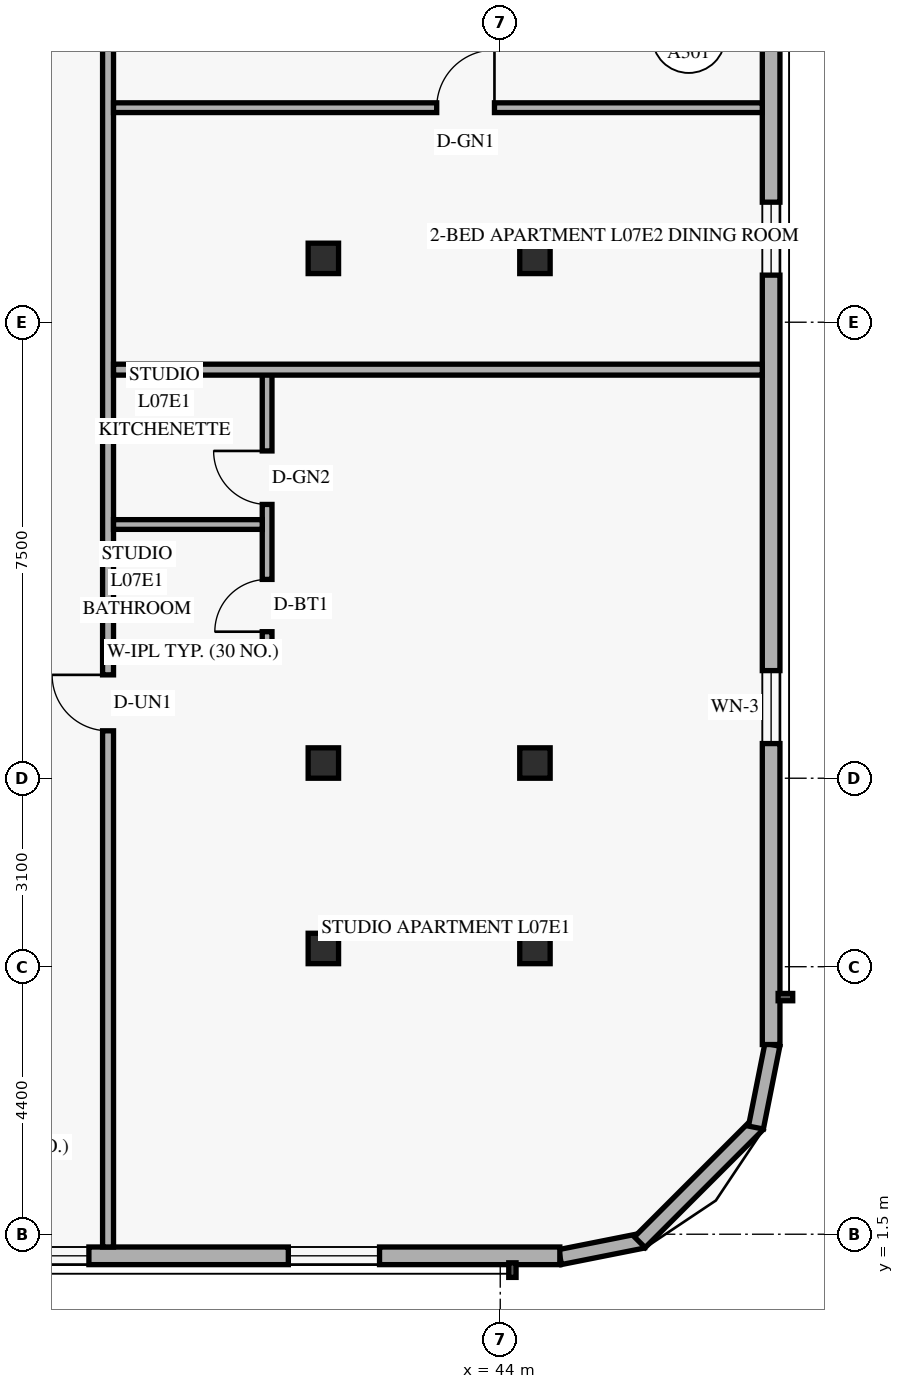
"""IFC4 building model, lengths in metres.
Left out: names, types, materials, properties, quantities, classifications, styles, units other than length and angle.
Written with IfcOpenShell. Run it as: python <this file> out.ifc"""

import sys

from ifc_helpers import new_model, si_unit, direction, frame, frame_2d, origin, origin_2d, place, context, subcontext, project, spatial, rectangle, hollow_rectangle, extrude, element, fill, save


model = new_model("IFC4")
c1 = context("Model", 3, precision=1e-05, world=origin(), true_north=direction((0.0, 1.0)))
c2 = subcontext(c1, "Body", "Model", "MODEL_VIEW")
j1 = project(units=[si_unit("LENGTHUNIT", "METRE"), si_unit("PLANEANGLEUNIT", "RADIAN")], contexts=[c1])
p1 = place(None, origin())
s1 = spatial("IfcSite", under=j1, at=p1, CompositionType="ELEMENT")
p2 = place(p1, origin())
s2 = spatial("IfcBuilding", under=s1, at=p2, CompositionType="ELEMENT")
p3 = place(p2, frame((0.0, 0.0, 31.2)))
s3 = spatial("IfcBuildingStorey", under=s2, at=p3, CompositionType="ELEMENT", Elevation=31.2)
for number, where, z_axis, x_axis in (
    (1, (41.028, 6.2, 0.0), (0.035, 0.0, 0.999), (0.0, 1.0, 0.0)),
    (2, (41.028, 9.25, 0.0), (0.035, 0.0, 0.999), (0.0, 1.0, 0.0)),
    (3, (41.028, 17.55, 0.0), (0.035, 0.0, 0.999), (0.0, 1.0, 0.0)),
):
    element("IfcColumn", number, at=place(p3, frame(where, z_axis=z_axis, x_axis=x_axis)), inside=s3, PredefinedType="COLUMN", context=c2, shape_type="SweptSolid", body=[
        extrude(hollow_rectangle(XDim=0.5, YDim=0.5, WallThickness=0.022, at=origin_2d()), origin(), (0.0, 0.0, 1.0), 3.602),
    ])
for number, where, z_axis, x_axis in (
    (4, (44.466, 6.2, 0.0), (0.058, 0.0, 0.998), (0.0, 1.0, 0.0)),
    (5, (44.466, 9.25, 0.0), (0.058, 0.0, 0.998), (0.0, 1.0, 0.0)),
    (6, (44.466, 17.55, 0.0), (0.058, 0.0, 0.998), (0.0, 1.0, 0.0)),
):
    element("IfcColumn", number, at=place(p3, frame(where, z_axis=z_axis, x_axis=x_axis)), inside=s3, PredefinedType="COLUMN", context=c2, shape_type="SweptSolid", body=[
        extrude(hollow_rectangle(XDim=0.5, YDim=0.5, WallThickness=0.022, at=origin_2d()), origin(), (0.0, 0.0, 1.0), 3.606),
    ])
p4 = place(p3, frame((44.983, 1.124, 0.0), z_axis=(0.0, 0.0, 1.0), x_axis=(0.980809899341, 0.19496651342, 0.0)))
e7 = element("IfcWall", 7, at=p4, inside=s3, PredefinedType="SOLIDWALL", context=c2, shape_type="SweptSolid", body=[
    extrude(rectangle(XDim=1.389, YDim=0.25, at=frame_2d((0.694, 0.0))), origin(), (0.0, 0.0, 1.0), 3.36),
])
p5 = place(p3, frame((46.295, 1.368, 0.0), z_axis=(0.0, 0.0, 1.0), x_axis=(0.707106781187, 0.707106781187, 0.0)))
e8 = element("IfcWall", 8, at=p5, inside=s3, PredefinedType="SOLIDWALL", context=c2, shape_type="SweptSolid", body=[
    extrude(rectangle(XDim=2.739, YDim=0.25, at=frame_2d((1.37, 0.0))), origin(), (0.0, 0.0, 1.0), 3.36),
])
p6 = place(p3, frame((48.205, 3.254, 0.0), z_axis=(0.0, 0.0, 1.0), x_axis=(0.19496651342, 0.980809899341, 0.0)))
e9 = element("IfcWall", 9, at=p6, inside=s3, PredefinedType="SOLIDWALL", context=c2, shape_type="SweptSolid", body=[
    extrude(rectangle(XDim=1.389, YDim=0.25, at=frame_2d((0.694, 0.0))), origin(), (0.0, 0.0, 1.0), 3.36),
])
p7 = place(p3, frame((31.03, 1.145, 0.0), z_axis=(0.0, 0.0, 1.0), x_axis=(1.0, 0.0, 0.0)))
e10 = element("IfcWall", 10, at=p7, inside=s3, PredefinedType="SOLIDWALL", context=c2, shape_type="SweptSolid", body=[
    extrude(rectangle(XDim=13.95, YDim=0.29, at=frame_2d((6.975, 0.0))), origin(), (0.0, 0.0, 1.0), 3.36),
])
p8 = place(p7, frame((1.445, 0.0, 0.85)))
e11 = element("IfcOpeningElement", 11, at=p8, cuts=e10, PredefinedType="OPENING", context=c2, shape_type="SweptSolid", body=[
    extrude(rectangle(XDim=1.5, YDim=1.55, at=frame_2d((0.75, 0.775))), frame((0.0, 0.155, 0.0), z_axis=(0.0, -1.0, 0.0), x_axis=(1.0, 0.0, 0.0)), (0.0, 0.0, 1.0), 0.31),
])
p9 = place(p7, frame((4.705, 0.0, 0.85)))
e12 = element("IfcOpeningElement", 12, at=p9, cuts=e10, PredefinedType="OPENING", context=c2, shape_type="SweptSolid", body=[
    extrude(rectangle(XDim=1.5, YDim=1.55, at=frame_2d((0.75, 0.775))), frame((0.0, 0.155, 0.0), z_axis=(0.0, -1.0, 0.0), x_axis=(1.0, 0.0, 0.0)), (0.0, 0.0, 1.0), 0.31),
])
p10 = place(p7, frame((9.485, 0.0, 0.85)))
e13 = element("IfcOpeningElement", 13, at=p10, cuts=e10, PredefinedType="OPENING", context=c2, shape_type="SweptSolid", body=[
    extrude(rectangle(XDim=1.5, YDim=1.55, at=frame_2d((0.75, 0.775))), frame((0.0, 0.155, 0.0), z_axis=(0.0, -1.0, 0.0), x_axis=(1.0, 0.0, 0.0)), (0.0, 0.0, 1.0), 0.31),
])
p11 = place(p3, frame((48.455, 4.62, 0.0), z_axis=(0.0, 0.0, 1.0), x_axis=(0.0, 1.0, 0.0)))
e14 = element("IfcWall", 14, at=p11, inside=s3, PredefinedType="SOLIDWALL", context=c2, shape_type="SweptSolid", body=[
    extrude(rectangle(XDim=38.76, YDim=0.29, at=frame_2d((19.38, 0.0))), origin(), (0.0, 0.0, 1.0), 3.36),
])
p12 = place(p11, frame((4.95, 0.0, 0.85)))
e15 = element("IfcOpeningElement", 15, at=p12, cuts=e14, PredefinedType="OPENING", context=c2, shape_type="SweptSolid", body=[
    extrude(rectangle(XDim=1.2, YDim=1.5, at=frame_2d((0.6, 0.75))), frame((0.0, 0.155, 0.0), z_axis=(0.0, -1.0, 0.0), x_axis=(1.0, 0.0, 0.0)), (0.0, 0.0, 1.0), 0.31),
])
p13 = place(p11, frame((12.654, 0.0, 0.85)))
e16 = element("IfcOpeningElement", 16, at=p13, cuts=e14, PredefinedType="OPENING", context=c2, shape_type="SweptSolid", body=[
    extrude(rectangle(XDim=1.2, YDim=1.5, at=frame_2d((0.6, 0.75))), frame((0.0, 0.155, 0.0), z_axis=(0.0, -1.0, 0.0), x_axis=(1.0, 0.0, 0.0)), (0.0, 0.0, 1.0), 0.31),
])
p14 = place(p11, frame((18.479, 0.0, 0.85)))
e17 = element("IfcOpeningElement", 17, at=p14, cuts=e14, PredefinedType="OPENING", context=c2, shape_type="SweptSolid", body=[
    extrude(rectangle(XDim=1.2, YDim=1.5, at=frame_2d((0.6, 0.75))), frame((0.0, 0.155, 0.0), z_axis=(0.0, -1.0, 0.0), x_axis=(1.0, 0.0, 0.0)), (0.0, 0.0, 1.0), 0.31),
])
p15 = place(p11, frame((24.145, 0.0, 0.85)))
e18 = element("IfcOpeningElement", 18, at=p15, cuts=e14, PredefinedType="OPENING", context=c2, shape_type="SweptSolid", body=[
    extrude(rectangle(XDim=1.2, YDim=1.5, at=frame_2d((0.6, 0.75))), frame((0.0, 0.155, 0.0), z_axis=(0.0, -1.0, 0.0), x_axis=(1.0, 0.0, 0.0)), (0.0, 0.0, 1.0), 0.31),
])
p16 = place(p11, frame((32.15, 0.0, 0.85)))
e19 = element("IfcOpeningElement", 19, at=p16, cuts=e14, PredefinedType="OPENING", context=c2, shape_type="SweptSolid", body=[
    extrude(rectangle(XDim=1.2, YDim=1.5, at=frame_2d((0.6, 0.75))), frame((0.0, 0.155, 0.0), z_axis=(0.0, -1.0, 0.0), x_axis=(1.0, 0.0, 0.0)), (0.0, 0.0, 1.0), 0.31),
])
p17 = place(p3, frame((37.55, 1.29, 0.0), z_axis=(0.0, 0.0, 1.0), x_axis=(0.0, 1.0, 0.0)))
e20 = element("IfcWall", 20, at=p17, inside=s3, PredefinedType="STANDARD", context=c2, shape_type="SweptSolid", body=[
    extrude(rectangle(XDim=45.42, YDim=0.18, at=frame_2d((22.71, 0.0))), origin(), (0.0, 0.0, 1.0), 2.649),
])
p18 = place(p17, frame((8.49, 0.0, 0.0)))
e21 = element("IfcOpeningElement", 21, at=p18, cuts=e20, PredefinedType="OPENING", context=c2, shape_type="SweptSolid", body=[
    extrude(rectangle(XDim=0.92, YDim=2.15, at=frame_2d((0.46, 1.075))), frame((0.0, 0.1, 0.0), z_axis=(0.0, -1.0, 0.0), x_axis=(1.0, 0.0, 0.0)), (0.0, 0.0, 1.0), 0.2),
])
p19 = place(p17, frame((20.073, 0.0, 0.0)))
e22 = element("IfcOpeningElement", 22, at=p19, cuts=e20, PredefinedType="OPENING", context=c2, shape_type="SweptSolid", body=[
    extrude(rectangle(XDim=0.92, YDim=2.15, at=frame_2d((0.46, 1.075))), frame((0.0, 0.1, 0.0), z_axis=(0.0, -1.0, 0.0), x_axis=(1.0, 0.0, 0.0)), (0.0, 0.0, 1.0), 0.2),
])
p20 = place(p17, frame((35.256, 0.0, 0.0)))
e23 = element("IfcOpeningElement", 23, at=p20, cuts=e20, PredefinedType="OPENING", context=c2, shape_type="SweptSolid", body=[
    extrude(rectangle(XDim=0.92, YDim=2.15, at=frame_2d((0.46, 1.075))), frame((0.0, 0.1, 0.0), z_axis=(0.0, -1.0, 0.0), x_axis=(1.0, 0.0, 0.0)), (0.0, 0.0, 1.0), 0.2),
])
p21 = place(p3, frame((37.64, 11.08, 0.0), z_axis=(0.0, 0.0, 1.0), x_axis=(1.0, 0.0, 0.0)))
e24 = element("IfcWall", 24, at=p21, inside=s3, PredefinedType="PLUMBINGWALL", context=c2, shape_type="SweptSolid", body=[
    extrude(rectangle(XDim=2.606, YDim=0.16, at=frame_2d((1.303, 0.0))), origin(), (0.0, 0.0, 1.0), 3.36),
])
p22 = place(p3, frame((40.166, 10.99, 0.0), z_axis=(0.0, 0.0, 1.0), x_axis=(0.0, 1.0, 0.0)))
e25 = element("IfcWall", 25, at=p22, inside=s3, PredefinedType="PLUMBINGWALL", context=c2, shape_type="SweptSolid", body=[
    extrude(rectangle(XDim=4.73, YDim=0.16, at=frame_2d((2.365, 0.0))), origin(), (0.0, 0.0, 1.0), 2.932),
])
p23 = place(p22, frame((0.42, 0.0, 0.0)))
e26 = element("IfcOpeningElement", 26, at=p23, cuts=e25, PredefinedType="OPENING", context=c2, shape_type="SweptSolid", body=[
    extrude(rectangle(XDim=0.86, YDim=2.12, at=frame_2d((0.43, 1.06))), frame((0.0, 0.09, 0.0), z_axis=(0.0, -1.0, 0.0), x_axis=(1.0, 0.0, 0.0)), (0.0, 0.0, 1.0), 0.18),
])
p24 = place(p22, frame((2.513, 0.0, 0.0)))
e27 = element("IfcOpeningElement", 27, at=p24, cuts=e25, PredefinedType="OPENING", context=c2, shape_type="SweptSolid", body=[
    extrude(rectangle(XDim=0.88, YDim=2.12, at=frame_2d((0.44, 1.06))), frame((0.0, 0.09, 0.0), z_axis=(0.0, -1.0, 0.0), x_axis=(1.0, 0.0, 0.0)), (0.0, 0.0, 1.0), 0.18),
])
p25 = place(p3, frame((37.64, 13.173, 0.0), z_axis=(0.0, 0.0, 1.0), x_axis=(1.0, 0.0, 0.0)))
e28 = element("IfcWall", 28, at=p25, inside=s3, PredefinedType="PLUMBINGWALL", context=c2, shape_type="SweptSolid", body=[
    extrude(rectangle(XDim=2.446, YDim=0.16, at=frame_2d((1.223, 0.0))), origin(), (0.0, 0.0, 1.0), 3.36),
])
p26 = place(p3, frame((37.64, 15.72, 0.0), z_axis=(0.0, 0.0, 1.0), x_axis=(1.0, 0.0, 0.0)))
e29 = element("IfcWall", 29, at=p26, inside=s3, PredefinedType="PARTITIONING", context=c2, shape_type="SweptSolid", body=[
    extrude(rectangle(XDim=10.67, YDim=0.18, at=frame_2d((5.335, 0.0))), origin(), (0.0, 0.0, 1.0), 2.649),
])
p27 = place(p3, frame((37.64, 20.029, 0.0), z_axis=(0.0, 0.0, 1.0), x_axis=(1.0, 0.0, 0.0)))
e30 = element("IfcWall", 30, at=p27, inside=s3, PredefinedType="PARTITIONING", context=c2, shape_type="SweptSolid", body=[
    extrude(rectangle(XDim=10.67, YDim=0.16, at=frame_2d((5.335, 0.0))), origin(), (0.0, 0.0, 1.0), 2.649),
])
p28 = place(p27, frame((5.315, 0.0, 0.0)))
e31 = element("IfcOpeningElement", 31, at=p28, cuts=e30, PredefinedType="OPENING", context=c2, shape_type="SweptSolid", body=[
    extrude(rectangle(XDim=0.95, YDim=2.15, at=frame_2d((0.475, 1.075))), frame((0.0, 0.09, 0.0), z_axis=(0.0, -1.0, 0.0), x_axis=(1.0, 0.0, 0.0)), (0.0, 0.0, 1.0), 0.18),
])
p29 = place(p9, origin())
e32 = element("IfcWindow", 32, at=p29, inside=s3, PartitioningType="SINGLE_PANEL", PredefinedType="WINDOW", context=c2, shape_type="SweptSolid", body=[
    extrude(rectangle(XDim=1.5, YDim=1.55, at=frame_2d((0.75, 0.775))), frame((0.0, 0.03, 0.0), z_axis=(0.0, -1.0, 0.0), x_axis=(1.0, 0.0, 0.0)), (0.0, 0.0, 1.0), 0.06),
])
fill(e12, e32)
p30 = place(p10, origin())
e33 = element("IfcWindow", 33, at=p30, inside=s3, PartitioningType="SINGLE_PANEL", PredefinedType="WINDOW", context=c2, shape_type="SweptSolid", body=[
    extrude(rectangle(XDim=1.5, YDim=1.55, at=frame_2d((0.75, 0.775))), frame((0.0, 0.03, 0.0), z_axis=(0.0, -1.0, 0.0), x_axis=(1.0, 0.0, 0.0)), (0.0, 0.0, 1.0), 0.06),
])
fill(e13, e33)
p31 = place(p12, origin())
e34 = element("IfcWindow", 34, at=p31, inside=s3, PartitioningType="SINGLE_PANEL", PredefinedType="WINDOW", context=c2, shape_type="SweptSolid", body=[
    extrude(rectangle(XDim=1.2, YDim=1.5, at=frame_2d((0.6, 0.75))), frame((0.0, 0.03, 0.0), z_axis=(0.0, -1.0, 0.0), x_axis=(1.0, 0.0, 0.0)), (0.0, 0.0, 1.0), 0.06),
])
fill(e15, e34)
p32 = place(p13, origin())
e35 = element("IfcWindow", 35, at=p32, inside=s3, PartitioningType="SINGLE_PANEL", PredefinedType="WINDOW", context=c2, shape_type="SweptSolid", body=[
    extrude(rectangle(XDim=1.2, YDim=1.5, at=frame_2d((0.6, 0.75))), frame((0.0, 0.03, 0.0), z_axis=(0.0, -1.0, 0.0), x_axis=(1.0, 0.0, 0.0)), (0.0, 0.0, 1.0), 0.06),
])
fill(e16, e35)
p33 = place(p18, origin())
e36 = element("IfcDoor", 36, at=p33, inside=s3, OperationType="SINGLE_SWING_RIGHT", PredefinedType="DOOR", context=c2, shape_type="SweptSolid", body=[
    extrude(rectangle(XDim=0.92, YDim=2.15, at=frame_2d((0.46, 1.075))), frame((0.0, 0.025, 0.0), z_axis=(0.0, -1.0, 0.0), x_axis=(1.0, 0.0, 0.0)), (0.0, 0.0, 1.0), 0.05),
])
fill(e21, e36)
p34 = place(p23, origin())
e37 = element("IfcDoor", 37, at=p34, inside=s3, OperationType="SINGLE_SWING_LEFT", PredefinedType="DOOR", context=c2, shape_type="SweptSolid", body=[
    extrude(rectangle(XDim=0.86, YDim=2.12, at=frame_2d((0.43, 1.06))), frame((0.0, 0.025, 0.0), z_axis=(0.0, -1.0, 0.0), x_axis=(1.0, 0.0, 0.0)), (0.0, 0.0, 1.0), 0.05),
])
fill(e26, e37)
p35 = place(p24, origin())
e38 = element("IfcDoor", 38, at=p35, inside=s3, OperationType="SINGLE_SWING_RIGHT", PredefinedType="DOOR", context=c2, shape_type="SweptSolid", body=[
    extrude(rectangle(XDim=0.88, YDim=2.12, at=frame_2d((0.44, 1.06))), frame((0.0, 0.025, 0.0), z_axis=(0.0, -1.0, 0.0), x_axis=(1.0, 0.0, 0.0)), (0.0, 0.0, 1.0), 0.05),
])
fill(e27, e38)
p36 = place(p28, origin())
e39 = element("IfcDoor", 39, at=p36, inside=s3, OperationType="SINGLE_SWING_RIGHT", PredefinedType="DOOR", context=c2, shape_type="SweptSolid", body=[
    extrude(rectangle(XDim=0.95, YDim=2.15, at=frame_2d((0.475, 1.075))), frame((0.0, 0.025, 0.0), z_axis=(0.0, -1.0, 0.0), x_axis=(1.0, 0.0, 0.0)), (0.0, 0.0, 1.0), 0.05),
])
fill(e31, e39)
save(model, sys.argv[1])
